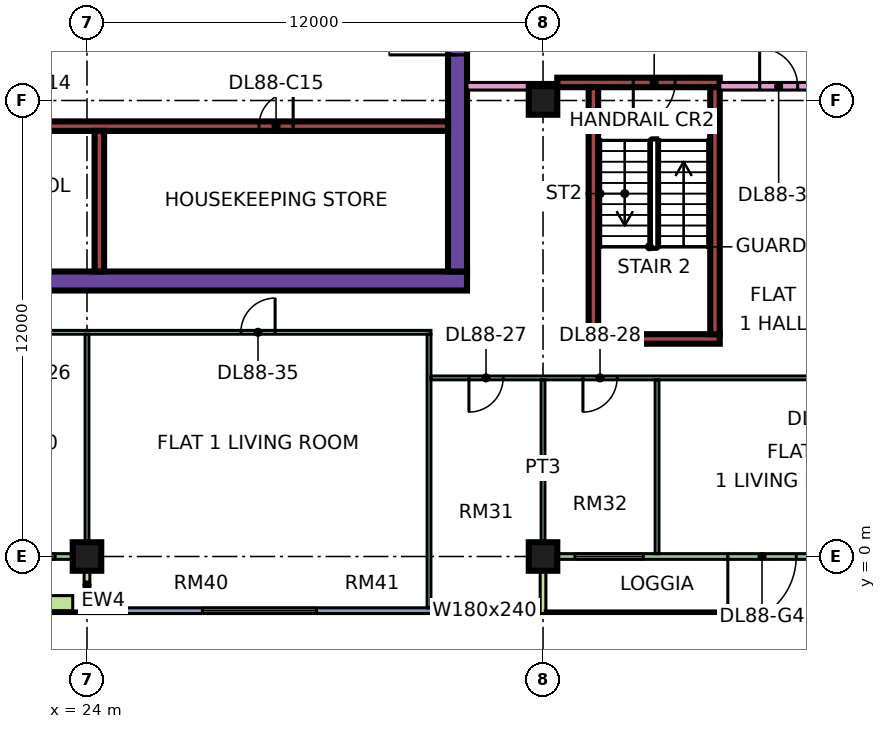
"""IFC4 building model, lengths in metres.
Left out: names, types, materials, properties, quantities, classifications, styles, units other than length and angle.
Written with IfcOpenShell. Run it as: python <this file> out.ifc"""

import sys

from ifc_helpers import new_model, si_unit, direction, frame, frame_2d, origin, origin_2d, place, context, subcontext, project, spatial, rectangle, extrude, element, fill, save


model = new_model("IFC4")
c1 = context("Model", 3, precision=1e-05, world=origin(), true_north=direction((0.0, 1.0)))
c2 = subcontext(c1, "Body", "Model", "MODEL_VIEW")
j1 = project(units=[si_unit("LENGTHUNIT", "METRE"), si_unit("PLANEANGLEUNIT", "RADIAN")], contexts=[c1])
p1 = place(None, origin())
s1 = spatial("IfcSite", under=j1, at=p1, CompositionType="ELEMENT")
p2 = place(p1, origin())
s2 = spatial("IfcBuilding", under=s1, at=p2, CompositionType="ELEMENT")
p3 = place(p2, frame((0.0, 0.0, 376.4)))
s3 = spatial("IfcBuildingStorey", under=s2, at=p3, CompositionType="ELEMENT", Elevation=376.4)
for number, where, z_axis, x_axis in (
    (1, (24.0, 0.0, 0.0), (0.0, 0.0, 1.0), (1.0, 0.0, 0.0)),
    (2, (36.0, 0.0, 0.0), (0.0, 0.0, 1.0), (1.0, 0.0, 0.0)),
    (3, (36.0, 12.0, 0.0), (0.0, 0.0, 1.0), (1.0, 0.0, 0.0)),
):
    element("IfcColumn", number, at=place(p3, frame(where, z_axis=z_axis, x_axis=x_axis)), inside=s3, PredefinedType="COLUMN", context=c2, shape_type="SweptSolid", body=[
        extrude(rectangle(XDim=0.75, YDim=0.75, at=origin_2d()), origin(), (0.0, 0.0, 1.0), 3.75),
    ])
p4 = place(p3, frame((9.0, 7.25, 0.0), z_axis=(0.0, 0.0, 1.0), x_axis=(1.0, 0.0, 0.0)))
e4 = element("IfcWall", 4, at=p4, inside=s3, PredefinedType="SHEAR", context=c2, shape_type="SweptSolid", body=[
    extrude(rectangle(XDim=25.0, YDim=0.5, at=frame_2d((12.5, 0.0))), origin(), (0.0, 0.0, 1.0), 3.75),
])
p5 = place(p3, frame((33.75, 7.5, 0.0), z_axis=(0.0, 0.0, 1.0), x_axis=(0.0, 1.0, 0.0)))
e5 = element("IfcWall", 5, at=p5, inside=s3, PredefinedType="SHEAR", context=c2, shape_type="SweptSolid", body=[
    extrude(rectangle(XDim=12.0, YDim=0.5, at=frame_2d((6.0, 0.0))), origin(), (0.0, 0.0, 1.0), 3.75),
])
p6 = place(p5, frame((5.7, 0.0, 0.0)))
e6 = element("IfcOpeningElement", 6, at=p6, cuts=e5, PredefinedType="OPENING", context=c2, shape_type="SweptSolid", body=[
    extrude(rectangle(XDim=1.8, YDim=2.4, at=frame_2d((0.9, 1.2))), frame((0.0, 0.26, 0.0), z_axis=(0.0, -1.0, 0.0), x_axis=(1.0, 0.0, 0.0)), (0.0, 0.0, 1.0), 0.52),
])
p7 = place(p3, frame((13.45, 11.325, 0.0), z_axis=(0.0, 0.0, 1.0), x_axis=(1.0, 0.0, 0.0)))
e7 = element("IfcWall", 7, at=p7, inside=s3, PredefinedType="SHEAR", context=c2, shape_type="SweptSolid", body=[
    extrude(rectangle(XDim=20.05, YDim=0.25, at=frame_2d((10.025, 0.0))), origin(), (0.0, 0.0, 1.0), 3.75),
])
p8 = place(p7, frame((1.55, 0.0, 0.0)))
e8 = element("IfcOpeningElement", 8, at=p8, cuts=e7, PredefinedType="OPENING", context=c2, shape_type="SweptSolid", body=[
    extrude(rectangle(XDim=0.9, YDim=2.1, at=frame_2d((0.45, 1.05))), frame((0.0, 0.135, 0.0), z_axis=(0.0, -1.0, 0.0), x_axis=(1.0, 0.0, 0.0)), (0.0, 0.0, 1.0), 0.27),
])
p9 = place(p7, frame((5.05, 0.0, 0.0)))
e9 = element("IfcOpeningElement", 9, at=p9, cuts=e7, PredefinedType="OPENING", context=c2, shape_type="SweptSolid", body=[
    extrude(rectangle(XDim=0.9, YDim=2.1, at=frame_2d((0.45, 1.05))), frame((0.0, 0.135, 0.0), z_axis=(0.0, -1.0, 0.0), x_axis=(1.0, 0.0, 0.0)), (0.0, 0.0, 1.0), 0.27),
])
p10 = place(p7, frame((8.425, 0.0, 0.0)))
e10 = element("IfcOpeningElement", 10, at=p10, cuts=e7, PredefinedType="OPENING", context=c2, shape_type="SweptSolid", body=[
    extrude(rectangle(XDim=0.9, YDim=2.1, at=frame_2d((0.45, 1.05))), frame((0.0, 0.135, 0.0), z_axis=(0.0, -1.0, 0.0), x_axis=(1.0, 0.0, 0.0)), (0.0, 0.0, 1.0), 0.27),
])
p11 = place(p7, frame((15.075, 0.0, 0.0)))
e11 = element("IfcOpeningElement", 11, at=p11, cuts=e7, PredefinedType="OPENING", context=c2, shape_type="SweptSolid", body=[
    extrude(rectangle(XDim=0.9, YDim=2.1, at=frame_2d((0.45, 1.05))), frame((0.0, 0.135, 0.0), z_axis=(0.0, -1.0, 0.0), x_axis=(1.0, 0.0, 0.0)), (0.0, 0.0, 1.0), 0.27),
])
p12 = place(p3, frame((24.325, 7.5, 0.0), z_axis=(0.0, 0.0, 1.0), x_axis=(0.0, 1.0, 0.0)))
e12 = element("IfcWall", 12, at=p12, inside=s3, PredefinedType="SHEAR", context=c2, shape_type="SweptSolid", body=[
    extrude(rectangle(XDim=3.7, YDim=0.25, at=frame_2d((1.85, 0.0))), origin(), (0.0, 0.0, 1.0), 3.75),
])
p13 = place(p3, frame((37.2, 5.725, 0.0), z_axis=(0.0, 0.0, 1.0), x_axis=(1.0, 0.0, 0.0)))
e13 = element("IfcWall", 13, at=p13, inside=s3, PredefinedType="SHEAR", context=c2, shape_type="SweptSolid", body=[
    extrude(rectangle(XDim=3.45, YDim=0.25, at=frame_2d((1.725, 0.0))), origin(), (0.0, 0.0, 1.0), 3.75),
])
p14 = place(p3, frame((36.375, 12.475, 0.0), z_axis=(0.0, 0.0, 1.0), x_axis=(1.0, 0.0, 0.0)))
e14 = element("IfcWall", 14, at=p14, inside=s3, PredefinedType="SHEAR", context=c2, shape_type="SweptSolid", body=[
    extrude(rectangle(XDim=4.275, YDim=0.25, at=frame_2d((2.137, 0.0))), origin(), (0.0, 0.0, 1.0), 3.75),
])
p15 = place(p14, frame((2.0, 0.0, 0.0)))
e15 = element("IfcOpeningElement", 15, at=p15, cuts=e14, PredefinedType="OPENING", context=c2, shape_type="SweptSolid", body=[
    extrude(rectangle(XDim=1.1, YDim=2.2, at=frame_2d((0.55, 1.1))), frame((0.0, 0.135, 0.0), z_axis=(0.0, -1.0, 0.0), x_axis=(1.0, 0.0, 0.0)), (0.0, 0.0, 1.0), 0.27),
])
for number, where, z_axis, x_axis in (
    (16, (37.325, 5.85, 0.0), (0.0, 0.0, 1.0), (0.0, 1.0, 0.0)),
    (17, (40.525, 5.85, 0.0), (0.0, 0.0, 1.0), (0.0, 1.0, 0.0)),
):
    element("IfcWall", number, at=place(p3, frame(where, z_axis=z_axis, x_axis=x_axis)), inside=s3, PredefinedType="SHEAR", context=c2, shape_type="SweptSolid", body=[
        extrude(rectangle(XDim=6.5, YDim=0.25, at=frame_2d((3.25, 0.0))), origin(), (0.0, 0.0, 1.0), 3.75),
    ])
p16 = place(p3, frame((12.575, 0.0, 0.0), z_axis=(0.0, 0.0, 1.0), x_axis=(1.0, 0.0, 0.0)))
e18 = element("IfcWall", 18, at=p16, inside=s3, PredefinedType="SOLIDWALL", context=c2, shape_type="SweptSolid", body=[
    extrude(rectangle(XDim=11.35, YDim=0.15, at=frame_2d((5.675, 0.0))), origin(), (0.0, 0.0, 1.0), 3.35),
])
p17 = place(p16, frame((0.613, 0.0, 0.0)))
e19 = element("IfcOpeningElement", 19, at=p17, cuts=e18, PredefinedType="OPENING", context=c2, shape_type="SweptSolid", body=[
    extrude(rectangle(XDim=1.2, YDim=2.4, at=frame_2d((0.6, 1.2))), frame((0.0, 0.085, 0.0), z_axis=(0.0, -1.0, 0.0), x_axis=(1.0, 0.0, 0.0)), (0.0, 0.0, 1.0), 0.17),
])
p18 = place(p16, frame((3.025, 0.0, 0.45)))
e20 = element("IfcOpeningElement", 20, at=p18, cuts=e18, PredefinedType="OPENING", context=c2, shape_type="SweptSolid", body=[
    extrude(rectangle(XDim=1.8, YDim=2.4, at=frame_2d((0.9, 1.2))), frame((0.0, 0.085, 0.0), z_axis=(0.0, -1.0, 0.0), x_axis=(1.0, 0.0, 0.0)), (0.0, 0.0, 1.0), 0.17),
])
p19 = place(p16, frame((6.025, 0.0, 0.45)))
e21 = element("IfcOpeningElement", 21, at=p19, cuts=e18, PredefinedType="OPENING", context=c2, shape_type="SweptSolid", body=[
    extrude(rectangle(XDim=1.8, YDim=2.4, at=frame_2d((0.9, 1.2))), frame((0.0, 0.085, 0.0), z_axis=(0.0, -1.0, 0.0), x_axis=(1.0, 0.0, 0.0)), (0.0, 0.0, 1.0), 0.17),
])
p20 = place(p16, frame((8.788, 0.0, 0.45)))
e22 = element("IfcOpeningElement", 22, at=p20, cuts=e18, PredefinedType="OPENING", context=c2, shape_type="SweptSolid", body=[
    extrude(rectangle(XDim=1.8, YDim=2.4, at=frame_2d((0.9, 1.2))), frame((0.0, 0.085, 0.0), z_axis=(0.0, -1.0, 0.0), x_axis=(1.0, 0.0, 0.0)), (0.0, 0.0, 1.0), 0.17),
])
p21 = place(p3, frame((24.0, -1.5, 0.0), z_axis=(0.0, 0.0, 1.0), x_axis=(0.0, 1.0, 0.0)))
e23 = element("IfcWall", 23, at=p21, inside=s3, PredefinedType="SOLIDWALL", context=c2, shape_type="SweptSolid", body=[
    extrude(rectangle(XDim=1.5, YDim=0.15, at=frame_2d((0.75, 0.0))), origin(), (0.0, 0.0, 1.0), 3.35),
])
p22 = place(p3, frame((24.075, -1.425, 0.0), z_axis=(0.0, 0.0, 1.0), x_axis=(1.0, 0.0, 0.0)))
e24 = element("IfcWall", 24, at=p22, inside=s3, PredefinedType="SOLIDWALL", context=c2, shape_type="SweptSolid", body=[
    extrude(rectangle(XDim=11.85, YDim=0.15, at=frame_2d((5.925, 0.0))), origin(), (0.0, 0.0, 1.0), 3.35),
])
p23 = place(p22, frame((2.962, 0.0, 0.45)))
e25 = element("IfcOpeningElement", 25, at=p23, cuts=e24, PredefinedType="OPENING", context=c2, shape_type="SweptSolid", body=[
    extrude(rectangle(XDim=3.0, YDim=2.4, at=frame_2d((1.5, 1.2))), frame((0.0, 0.085, 0.0), z_axis=(0.0, -1.0, 0.0), x_axis=(1.0, 0.0, 0.0)), (0.0, 0.0, 1.0), 0.17),
])
p24 = place(p22, frame((9.488, 0.0, 0.45)))
e26 = element("IfcOpeningElement", 26, at=p24, cuts=e24, PredefinedType="OPENING", context=c2, shape_type="SweptSolid", body=[
    extrude(rectangle(XDim=1.8, YDim=2.4, at=frame_2d((0.9, 1.2))), frame((0.0, 0.085, 0.0), z_axis=(0.0, -1.0, 0.0), x_axis=(1.0, 0.0, 0.0)), (0.0, 0.0, 1.0), 0.17),
])
p25 = place(p3, frame((36.075, 0.0, 0.0), z_axis=(0.0, 0.0, 1.0), x_axis=(1.0, 0.0, 0.0)))
e27 = element("IfcWall", 27, at=p25, inside=s3, PredefinedType="SOLIDWALL", context=c2, shape_type="SweptSolid", body=[
    extrude(rectangle(XDim=11.85, YDim=0.15, at=frame_2d((5.925, 0.0))), origin(), (0.0, 0.0, 1.0), 3.35),
])
p26 = place(p25, frame((0.762, 0.0, 0.45)))
e28 = element("IfcOpeningElement", 28, at=p26, cuts=e27, PredefinedType="OPENING", context=c2, shape_type="SweptSolid", body=[
    extrude(rectangle(XDim=1.8, YDim=2.4, at=frame_2d((0.9, 1.2))), frame((0.0, 0.085, 0.0), z_axis=(0.0, -1.0, 0.0), x_axis=(1.0, 0.0, 0.0)), (0.0, 0.0, 1.0), 0.17),
])
p27 = place(p25, frame((4.788, 0.0, 0.0)))
e29 = element("IfcOpeningElement", 29, at=p27, cuts=e27, PredefinedType="OPENING", context=c2, shape_type="SweptSolid", body=[
    extrude(rectangle(XDim=1.8, YDim=2.4, at=frame_2d((0.9, 1.2))), frame((0.0, 0.085, 0.0), z_axis=(0.0, -1.0, 0.0), x_axis=(1.0, 0.0, 0.0)), (0.0, 0.0, 1.0), 0.17),
])
p28 = place(p25, frame((10.025, 0.0, 0.45)))
e30 = element("IfcOpeningElement", 30, at=p28, cuts=e27, PredefinedType="OPENING", context=c2, shape_type="SweptSolid", body=[
    extrude(rectangle(XDim=1.2, YDim=2.4, at=frame_2d((0.6, 1.2))), frame((0.0, 0.085, 0.0), z_axis=(0.0, -1.0, 0.0), x_axis=(1.0, 0.0, 0.0)), (0.0, 0.0, 1.0), 0.17),
])
p29 = place(p3, frame((36.0, -1.5, 0.0), z_axis=(0.0, 0.0, 1.0), x_axis=(0.0, 1.0, 0.0)))
e31 = element("IfcWall", 31, at=p29, inside=s3, PredefinedType="SOLIDWALL", context=c2, shape_type="SweptSolid", body=[
    extrude(rectangle(XDim=1.5, YDim=0.15, at=frame_2d((0.75, 0.0))), origin(), (0.0, 0.0, 1.0), 3.35),
])
p30 = place(p3, frame((12.875, -1.229, 0.0), z_axis=(0.0, 0.0, 1.0), x_axis=(1.0, 0.0, 0.0)))
e32 = element("IfcWall", 32, at=p30, inside=s3, PredefinedType="SOLIDWALL", context=c2, shape_type="SweptSolid", body=[
    extrude(rectangle(XDim=10.75, YDim=0.4, at=frame_2d((5.375, 0.0))), origin(), (0.0, 0.0, 1.0), 0.7),
])
p31 = place(p3, frame((11.95, 5.9, 0.0), z_axis=(0.0, 0.0, 1.0), x_axis=(1.0, 0.0, 0.0)))
e33 = element("IfcWall", 33, at=p31, inside=s3, PredefinedType="PARTITIONING", context=c2, shape_type="SweptSolid", body=[
    extrude(rectangle(XDim=21.1, YDim=0.1, at=frame_2d((10.55, 0.0))), origin(), (0.0, 0.0, 1.0), 3.35),
])
p32 = place(p31, frame((1.1, 0.0, 0.0)))
e34 = element("IfcOpeningElement", 34, at=p32, cuts=e33, PredefinedType="OPENING", context=c2, shape_type="SweptSolid", body=[
    extrude(rectangle(XDim=0.9, YDim=2.1, at=frame_2d((0.45, 1.05))), frame((0.0, 0.06, 0.0), z_axis=(0.0, -1.0, 0.0), x_axis=(1.0, 0.0, 0.0)), (0.0, 0.0, 1.0), 0.12),
])
p33 = place(p31, frame((4.1, 0.0, 0.0)))
e35 = element("IfcOpeningElement", 35, at=p33, cuts=e33, PredefinedType="OPENING", context=c2, shape_type="SweptSolid", body=[
    extrude(rectangle(XDim=0.9, YDim=2.1, at=frame_2d((0.45, 1.05))), frame((0.0, 0.06, 0.0), z_axis=(0.0, -1.0, 0.0), x_axis=(1.0, 0.0, 0.0)), (0.0, 0.0, 1.0), 0.12),
])
p34 = place(p31, frame((7.1, 0.0, 0.0)))
e36 = element("IfcOpeningElement", 36, at=p34, cuts=e33, PredefinedType="OPENING", context=c2, shape_type="SweptSolid", body=[
    extrude(rectangle(XDim=0.9, YDim=2.1, at=frame_2d((0.45, 1.05))), frame((0.0, 0.06, 0.0), z_axis=(0.0, -1.0, 0.0), x_axis=(1.0, 0.0, 0.0)), (0.0, 0.0, 1.0), 0.12),
])
p35 = place(p31, frame((10.1, 0.0, 0.0)))
e37 = element("IfcOpeningElement", 37, at=p35, cuts=e33, PredefinedType="OPENING", context=c2, shape_type="SweptSolid", body=[
    extrude(rectangle(XDim=0.9, YDim=2.1, at=frame_2d((0.45, 1.05))), frame((0.0, 0.06, 0.0), z_axis=(0.0, -1.0, 0.0), x_axis=(1.0, 0.0, 0.0)), (0.0, 0.0, 1.0), 0.12),
])
p36 = place(p31, frame((16.1, 0.0, 0.0)))
e38 = element("IfcOpeningElement", 38, at=p36, cuts=e33, PredefinedType="OPENING", context=c2, shape_type="SweptSolid", body=[
    extrude(rectangle(XDim=0.9, YDim=2.1, at=frame_2d((0.45, 1.05))), frame((0.0, 0.06, 0.0), z_axis=(0.0, -1.0, 0.0), x_axis=(1.0, 0.0, 0.0)), (0.0, 0.0, 1.0), 0.12),
])
p37 = place(p3, frame((24.0, 0.0, 0.0), z_axis=(0.0, 0.0, 1.0), x_axis=(0.0, 1.0, 0.0)))
e39 = element("IfcWall", 39, at=p37, inside=s3, PredefinedType="PARTITIONING", context=c2, shape_type="SweptSolid", body=[
    extrude(rectangle(XDim=5.85, YDim=0.1, at=frame_2d((2.925, 0.0))), origin(), (0.0, 0.0, 1.0), 3.35),
])
p38 = place(p3, frame((33.0, -1.35, 0.0), z_axis=(0.0, 0.0, 1.0), x_axis=(0.0, 1.0, 0.0)))
e40 = element("IfcWall", 40, at=p38, inside=s3, PredefinedType="PARTITIONING", context=c2, shape_type="SweptSolid", body=[
    extrude(rectangle(XDim=7.2, YDim=0.1, at=frame_2d((3.6, 0.0))), origin(), (0.0, 0.0, 1.0), 3.35),
])
p39 = place(p3, frame((33.05, 4.7, 0.0), z_axis=(0.0, 0.0, 1.0), x_axis=(1.0, 0.0, 0.0)))
e41 = element("IfcWall", 41, at=p39, inside=s3, PredefinedType="PARTITIONING", context=c2, shape_type="SweptSolid", body=[
    extrude(rectangle(XDim=22.301, YDim=0.1, at=frame_2d((11.15, 0.0))), origin(), (0.0, 0.0, 1.0), 3.35),
])
p40 = place(p39, frame((1.0, 0.0, 0.0)))
e42 = element("IfcOpeningElement", 42, at=p40, cuts=e41, PredefinedType="OPENING", context=c2, shape_type="SweptSolid", body=[
    extrude(rectangle(XDim=0.9, YDim=2.1, at=frame_2d((0.45, 1.05))), frame((0.0, 0.06, 0.0), z_axis=(0.0, -1.0, 0.0), x_axis=(1.0, 0.0, 0.0)), (0.0, 0.0, 1.0), 0.12),
])
p41 = place(p39, frame((4.0, 0.0, 0.0)))
e43 = element("IfcOpeningElement", 43, at=p41, cuts=e41, PredefinedType="OPENING", context=c2, shape_type="SweptSolid", body=[
    extrude(rectangle(XDim=0.9, YDim=2.1, at=frame_2d((0.45, 1.05))), frame((0.0, 0.06, 0.0), z_axis=(0.0, -1.0, 0.0), x_axis=(1.0, 0.0, 0.0)), (0.0, 0.0, 1.0), 0.12),
])
p42 = place(p39, frame((16.0, 0.0, 0.0)))
e44 = element("IfcOpeningElement", 44, at=p42, cuts=e41, PredefinedType="OPENING", context=c2, shape_type="SweptSolid", body=[
    extrude(rectangle(XDim=0.9, YDim=2.1, at=frame_2d((0.45, 1.05))), frame((0.0, 0.06, 0.0), z_axis=(0.0, -1.0, 0.0), x_axis=(1.0, 0.0, 0.0)), (0.0, 0.0, 1.0), 0.12),
])
p43 = place(p39, frame((19.0, 0.0, 0.0)))
e45 = element("IfcOpeningElement", 45, at=p43, cuts=e41, PredefinedType="OPENING", context=c2, shape_type="SweptSolid", body=[
    extrude(rectangle(XDim=0.9, YDim=2.1, at=frame_2d((0.45, 1.05))), frame((0.0, 0.06, 0.0), z_axis=(0.0, -1.0, 0.0), x_axis=(1.0, 0.0, 0.0)), (0.0, 0.0, 1.0), 0.12),
])
p44 = place(p39, frame((10.0, 0.0, 0.0)))
e46 = element("IfcOpeningElement", 46, at=p44, cuts=e41, PredefinedType="OPENING", context=c2, shape_type="SweptSolid", body=[
    extrude(rectangle(XDim=0.9, YDim=2.1, at=frame_2d((0.45, 1.05))), frame((0.0, 0.06, 0.0), z_axis=(0.0, -1.0, 0.0), x_axis=(1.0, 0.0, 0.0)), (0.0, 0.0, 1.0), 0.12),
])
p45 = place(p3, frame((34.0, 12.375, 0.0), z_axis=(0.0, 0.0, 1.0), x_axis=(1.0, 0.0, 0.0)))
e47 = element("IfcWall", 47, at=p45, inside=s3, PredefinedType="PARTITIONING", context=c2, shape_type="SweptSolid", body=[
    extrude(rectangle(XDim=2.376, YDim=0.2, at=frame_2d((1.188, 0.0))), origin(), (0.0, 0.0, 1.0), 3.35),
])
p46 = place(p3, frame((36.0, 0.0, 0.0), z_axis=(0.0, 0.0, 1.0), x_axis=(0.0, 1.0, 0.0)))
e48 = element("IfcWall", 48, at=p46, inside=s3, PredefinedType="PARTITIONING", context=c2, shape_type="SweptSolid", body=[
    extrude(rectangle(XDim=4.65, YDim=0.1, at=frame_2d((2.325, 0.0))), origin(), (0.0, 0.0, 1.0), 3.35),
])
p47 = place(p3, frame((39.0, 0.074, 0.0), z_axis=(0.0, 0.0, 1.0), x_axis=(0.0, 1.0, 0.0)))
e49 = element("IfcWall", 49, at=p47, inside=s3, PredefinedType="PARTITIONING", context=c2, shape_type="SweptSolid", body=[
    extrude(rectangle(XDim=4.576, YDim=0.1, at=frame_2d((2.288, 0.0))), origin(), (0.0, 0.0, 1.0), 3.35),
])
p48 = place(p3, frame((40.65, 12.375, 0.0), z_axis=(0.0, 0.0, 1.0), x_axis=(1.0, 0.0, 0.0)))
e50 = element("IfcWall", 50, at=p48, inside=s3, PredefinedType="PARTITIONING", context=c2, shape_type="SweptSolid", body=[
    extrude(rectangle(XDim=13.276, YDim=0.2, at=frame_2d((6.638, 0.0))), origin(), (0.0, 0.0, 1.0), 3.35),
])
p49 = place(p48, frame((1.05, 0.0, 0.0)))
e51 = element("IfcOpeningElement", 51, at=p49, cuts=e50, PredefinedType="OPENING", context=c2, shape_type="SweptSolid", body=[
    extrude(rectangle(XDim=1.0, YDim=2.1, at=frame_2d((0.5, 1.05))), frame((0.0, 0.11, 0.0), z_axis=(0.0, -1.0, 0.0), x_axis=(1.0, 0.0, 0.0)), (0.0, 0.0, 1.0), 0.22),
])
p50 = place(p20, origin())
e52 = element("IfcWindow", 52, at=p50, inside=s3, PartitioningType="SINGLE_PANEL", PredefinedType="WINDOW", context=c2, shape_type="SweptSolid", body=[
    extrude(rectangle(XDim=1.8, YDim=2.4, at=frame_2d((0.9, 1.2))), frame((0.0, 0.03, 0.0), z_axis=(0.0, -1.0, 0.0), x_axis=(1.0, 0.0, 0.0)), (0.0, 0.0, 1.0), 0.06),
])
fill(e22, e52)
p51 = place(p23, origin())
e53 = element("IfcWindow", 53, at=p51, inside=s3, PartitioningType="SINGLE_PANEL", PredefinedType="WINDOW", context=c2, shape_type="SweptSolid", body=[
    extrude(rectangle(XDim=3.0, YDim=2.4, at=frame_2d((1.5, 1.2))), frame((0.0, 0.03, 0.0), z_axis=(0.0, -1.0, 0.0), x_axis=(1.0, 0.0, 0.0)), (0.0, 0.0, 1.0), 0.06),
])
fill(e25, e53)
p52 = place(p24, origin())
e54 = element("IfcWindow", 54, at=p52, inside=s3, PartitioningType="SINGLE_PANEL", PredefinedType="WINDOW", context=c2, shape_type="SweptSolid", body=[
    extrude(rectangle(XDim=1.8, YDim=2.4, at=frame_2d((0.9, 1.2))), frame((0.0, 0.03, 0.0), z_axis=(0.0, -1.0, 0.0), x_axis=(1.0, 0.0, 0.0)), (0.0, 0.0, 1.0), 0.06),
])
fill(e26, e54)
p53 = place(p26, origin())
e55 = element("IfcWindow", 55, at=p53, inside=s3, PartitioningType="SINGLE_PANEL", PredefinedType="WINDOW", context=c2, shape_type="SweptSolid", body=[
    extrude(rectangle(XDim=1.8, YDim=2.4, at=frame_2d((0.9, 1.2))), frame((0.0, 0.03, 0.0), z_axis=(0.0, -1.0, 0.0), x_axis=(1.0, 0.0, 0.0)), (0.0, 0.0, 1.0), 0.06),
])
fill(e28, e55)
p54 = place(p27, frame((1.8, 0.0, 0.0), z_axis=(0.0, 0.0, 1.0), x_axis=(-1.0, 0.0, 0.0)))
e56 = element("IfcDoor", 56, at=p54, inside=s3, OperationType="DOUBLE_DOOR_SINGLE_SWING", PredefinedType="DOOR", context=c2, shape_type="SweptSolid", body=[
    extrude(rectangle(XDim=1.8, YDim=2.4, at=frame_2d((0.9, 1.2))), frame((0.0, 0.025, 0.0), z_axis=(0.0, -1.0, 0.0), x_axis=(1.0, 0.0, 0.0)), (0.0, 0.0, 1.0), 0.05),
])
fill(e29, e56)
p55 = place(p6, origin())
e57 = element("IfcDoor", 57, at=p55, inside=s3, OperationType="DOUBLE_DOOR_SINGLE_SWING", PredefinedType="DOOR", context=c2, shape_type="SweptSolid", body=[
    extrude(rectangle(XDim=1.8, YDim=2.4, at=frame_2d((0.9, 1.2))), frame((0.0, 0.025, 0.0), z_axis=(0.0, -1.0, 0.0), x_axis=(1.0, 0.0, 0.0)), (0.0, 0.0, 1.0), 0.05),
])
fill(e6, e57)
p56 = place(p15, frame((1.1, 0.0, 0.0), z_axis=(0.0, 0.0, 1.0), x_axis=(-1.0, 0.0, 0.0)))
e58 = element("IfcDoor", 58, at=p56, inside=s3, OperationType="SINGLE_SWING_LEFT", PredefinedType="DOOR", context=c2, shape_type="SweptSolid", body=[
    extrude(rectangle(XDim=1.1, YDim=2.2, at=frame_2d((0.55, 1.1))), frame((0.0, 0.025, 0.0), z_axis=(0.0, -1.0, 0.0), x_axis=(1.0, 0.0, 0.0)), (0.0, 0.0, 1.0), 0.05),
])
fill(e15, e58)
p57 = place(p11, frame((0.9, 0.0, 0.0), z_axis=(0.0, 0.0, 1.0), x_axis=(-1.0, 0.0, 0.0)))
e59 = element("IfcDoor", 59, at=p57, inside=s3, OperationType="SINGLE_SWING_RIGHT", PredefinedType="DOOR", context=c2, shape_type="SweptSolid", body=[
    extrude(rectangle(XDim=0.9, YDim=2.1, at=frame_2d((0.45, 1.05))), frame((0.0, 0.025, 0.0), z_axis=(0.0, -1.0, 0.0), x_axis=(1.0, 0.0, 0.0)), (0.0, 0.0, 1.0), 0.05),
])
fill(e11, e59)
p58 = place(p40, frame((0.9, 0.0, 0.0), z_axis=(0.0, 0.0, 1.0), x_axis=(-1.0, 0.0, 0.0)))
e60 = element("IfcDoor", 60, at=p58, inside=s3, OperationType="SINGLE_SWING_LEFT", PredefinedType="DOOR", context=c2, shape_type="SweptSolid", body=[
    extrude(rectangle(XDim=0.9, YDim=2.1, at=frame_2d((0.45, 1.05))), frame((0.0, 0.025, 0.0), z_axis=(0.0, -1.0, 0.0), x_axis=(1.0, 0.0, 0.0)), (0.0, 0.0, 1.0), 0.05),
])
fill(e42, e60)
p59 = place(p41, frame((0.9, 0.0, 0.0), z_axis=(0.0, 0.0, 1.0), x_axis=(-1.0, 0.0, 0.0)))
e61 = element("IfcDoor", 61, at=p59, inside=s3, OperationType="SINGLE_SWING_LEFT", PredefinedType="DOOR", context=c2, shape_type="SweptSolid", body=[
    extrude(rectangle(XDim=0.9, YDim=2.1, at=frame_2d((0.45, 1.05))), frame((0.0, 0.025, 0.0), z_axis=(0.0, -1.0, 0.0), x_axis=(1.0, 0.0, 0.0)), (0.0, 0.0, 1.0), 0.05),
])
fill(e43, e61)
p60 = place(p49, origin())
e62 = element("IfcDoor", 62, at=p60, inside=s3, OperationType="SINGLE_SWING_LEFT", PredefinedType="DOOR", context=c2, shape_type="SweptSolid", body=[
    extrude(rectangle(XDim=1.0, YDim=2.1, at=frame_2d((0.5, 1.05))), frame((0.0, 0.025, 0.0), z_axis=(0.0, -1.0, 0.0), x_axis=(1.0, 0.0, 0.0)), (0.0, 0.0, 1.0), 0.05),
])
fill(e51, e62)
p61 = place(p36, frame((0.9, 0.0, 0.0), z_axis=(0.0, 0.0, 1.0), x_axis=(-1.0, 0.0, 0.0)))
e63 = element("IfcDoor", 63, at=p61, inside=s3, OperationType="SINGLE_SWING_RIGHT", PredefinedType="DOOR", context=c2, shape_type="SweptSolid", body=[
    extrude(rectangle(XDim=0.9, YDim=2.1, at=frame_2d((0.45, 1.05))), frame((0.0, 0.025, 0.0), z_axis=(0.0, -1.0, 0.0), x_axis=(1.0, 0.0, 0.0)), (0.0, 0.0, 1.0), 0.05),
])
fill(e38, e63)
save(model, sys.argv[1])
